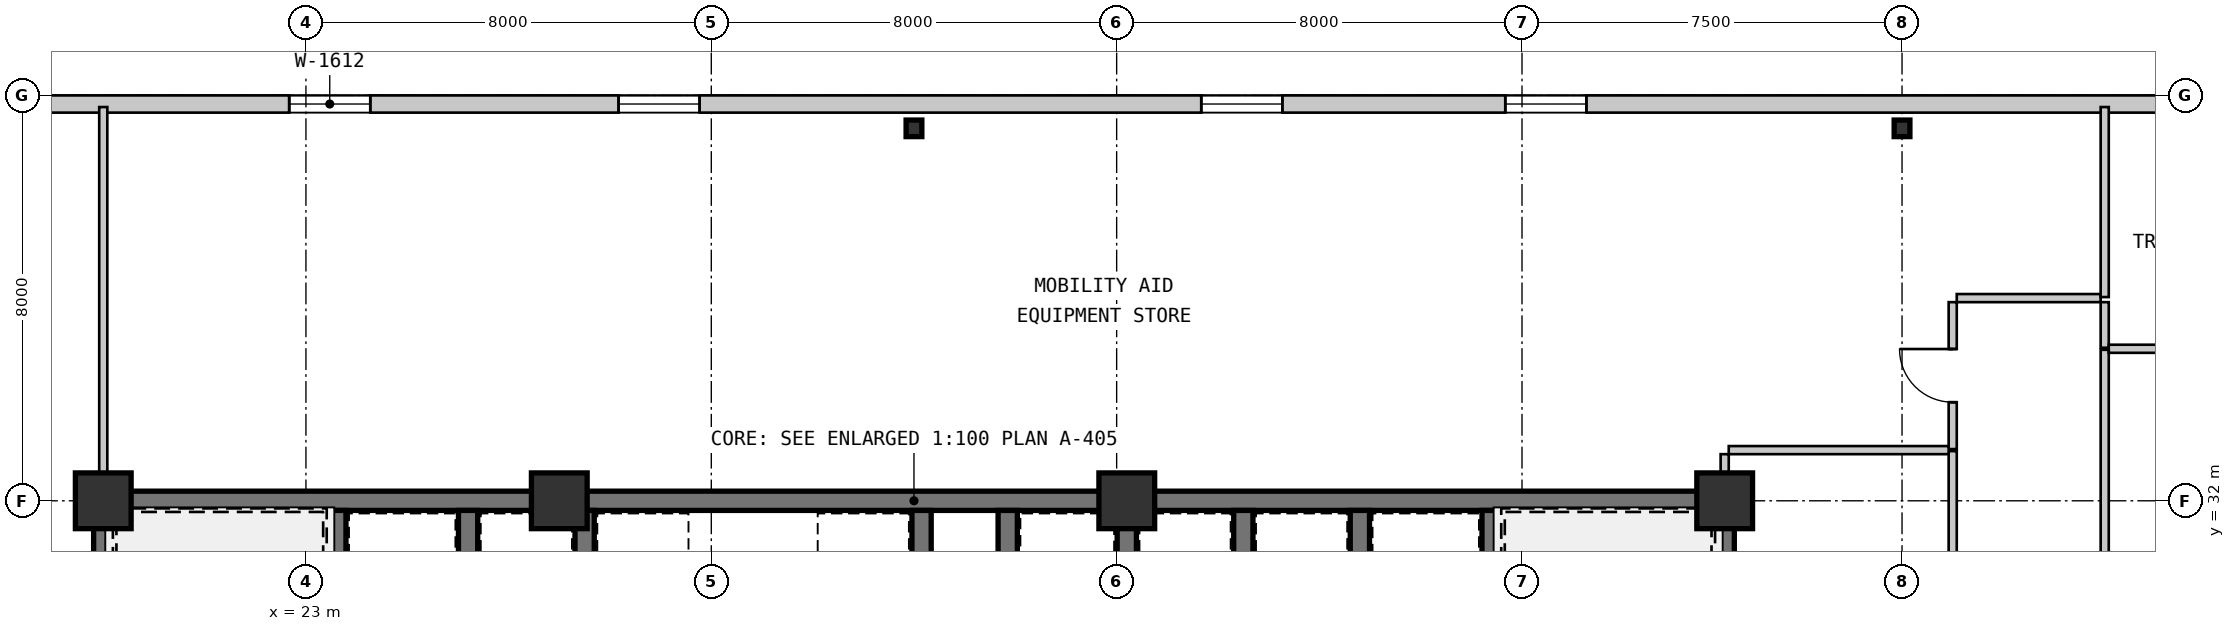
"""IFC4 building model, lengths in metres.
Left out: names, types, materials, properties, quantities, classifications, styles, units other than length and angle.
Written with IfcOpenShell. Run it as: python <this file> out.ifc"""

import sys

from ifc_helpers import new_model, si_unit, direction, frame, frame_2d, origin, origin_2d, place, context, subcontext, project, spatial, rectangle, i_section, extrude, source, transform, mapped, element, fill, save


model = new_model("IFC4")
c1 = context("Model", 3, precision=1e-05, world=origin(), true_north=direction((0.0, 1.0)))
c2 = subcontext(c1, "Body", "Model", "MODEL_VIEW")
j1 = project(units=[si_unit("LENGTHUNIT", "METRE"), si_unit("PLANEANGLEUNIT", "RADIAN")], contexts=[c1])
p1 = place(None, origin())
s1 = spatial("IfcSite", under=j1, at=p1, CompositionType="ELEMENT")
p2 = place(p1, origin())
s2 = spatial("IfcBuilding", under=s1, at=p2, CompositionType="ELEMENT")
p3 = place(p2, frame((0.0, 0.0, 8.4)))
s3 = spatial("IfcBuildingStorey", under=s2, at=p3, CompositionType="ELEMENT", Elevation=8.4)
m1 = source(origin(), c2, "Body", "SweptSolid", [
    extrude(rectangle(XDim=1.1, YDim=1.1, at=origin_2d()), origin(), (0.0, 0.0, 1.0), 4.55),
])
for number, where, z_axis, x_axis in (
    (1, (19.0, 32.0, 0.0), (0.0, 0.0, 1.0), (1.0, 0.0, 0.0)),
    (2, (28.0, 32.0, 0.0), (0.0, 0.0, 1.0), (1.0, 0.0, 0.0)),
    (3, (39.2, 32.0, 0.0), (0.0, 0.0, 1.0), (1.0, 0.0, 0.0)),
    (4, (51.0, 32.0, 0.0), (0.0, 0.0, 1.0), (1.0, 0.0, 0.0)),
):
    element("IfcColumn", number, at=place(p3, frame(where, z_axis=z_axis, x_axis=x_axis)), inside=s3, PredefinedType="COLUMN", context=c2, shape_type="MappedRepresentation", body=[
        mapped(m1, transform((0.0, 0.0, 0.0), scale=1.0)),
    ])
m2 = source(origin(), c2, "Body", "SweptSolid", [
    extrude(i_section(OverallWidth=0.311, OverallDepth=0.327, WebThickness=0.016, FlangeThickness=0.025, at=origin_2d()), origin(), (0.0, 0.0, 1.0), 4.55),
])
for number, where, z_axis, x_axis in (
    (5, (35.0, 39.35, 0.0), (0.0, 0.0, 1.0), (1.0, 0.0, 0.0)),
    (6, (54.5, 39.35, 0.0), (0.0, 0.0, 1.0), (1.0, 0.0, 0.0)),
):
    element("IfcColumn", number, at=place(p3, frame(where, z_axis=z_axis, x_axis=x_axis)), inside=s3, PredefinedType="COLUMN", context=c2, shape_type="MappedRepresentation", body=[
        mapped(m2, transform((0.0, 0.0, 0.0), scale=1.0)),
    ])
m3 = source(origin(), c2, "Body", "SweptSolid", [
    extrude(rectangle(XDim=69.66, YDim=0.34, at=frame_2d((34.83, 0.0))), origin(), (0.0, 0.0, 1.0), 4.29),
])
p4 = place(p3, frame((0.17, 39.83, 0.0), z_axis=(0.0, 0.0, 1.0), x_axis=(1.0, 0.0, 0.0)))
e7 = element("IfcWall", 7, at=p4, inside=s3, PredefinedType="SOLIDWALL", context=c2, shape_type="MappedRepresentation", body=[
    mapped(m3, transform((0.0, 0.0, 0.0), scale=1.0)),
])
m4 = source(origin(), c2, "Body", "SweptSolid", [
    extrude(rectangle(XDim=1.6, YDim=1.2, at=frame_2d((0.8, 0.6))), frame((0.0, 0.18, 0.0), z_axis=(0.0, -1.0, 0.0), x_axis=(1.0, 0.0, 0.0)), (0.0, 0.0, 1.0), 0.36),
])
p5 = place(p4, frame((4.5, 0.0, 0.95)))
e8 = element("IfcOpeningElement", 8, at=p5, cuts=e7, PredefinedType="OPENING", context=c2, shape_type="MappedRepresentation", body=[
    mapped(m4, transform((0.0, 0.0, 0.0), scale=1.0)),
])
p6 = place(p4, frame((22.5, 0.0, 0.95)))
e9 = element("IfcOpeningElement", 9, at=p6, cuts=e7, PredefinedType="OPENING", context=c2, shape_type="MappedRepresentation", body=[
    mapped(m4, transform((0.0, 0.0, 0.0), scale=1.0)),
])
p7 = place(p4, frame((29.0, 0.0, 0.95)))
e10 = element("IfcOpeningElement", 10, at=p7, cuts=e7, PredefinedType="OPENING", context=c2, shape_type="MappedRepresentation", body=[
    mapped(m4, transform((0.0, 0.0, 0.0), scale=1.0)),
])
p8 = place(p4, frame((40.5, 0.0, 0.95)))
e11 = element("IfcOpeningElement", 11, at=p8, cuts=e7, PredefinedType="OPENING", context=c2, shape_type="MappedRepresentation", body=[
    mapped(m4, transform((0.0, 0.0, 0.0), scale=1.0)),
])
p9 = place(p4, frame((46.5, 0.0, 0.95)))
e12 = element("IfcOpeningElement", 12, at=p9, cuts=e7, PredefinedType="OPENING", context=c2, shape_type="MappedRepresentation", body=[
    mapped(m4, transform((0.0, 0.0, 0.0), scale=1.0)),
])
p10 = place(p4, frame((62.5, 0.0, 0.95)))
e13 = element("IfcOpeningElement", 13, at=p10, cuts=e7, PredefinedType="OPENING", context=c2, shape_type="MappedRepresentation", body=[
    mapped(m4, transform((0.0, 0.0, 0.0), scale=1.0)),
])
m5 = source(origin(), c2, "Body", "SweptSolid", [
    extrude(rectangle(XDim=9.19, YDim=0.38, at=frame_2d((4.595, 0.0))), origin(), (0.0, 0.0, 1.0), 4.29),
])
p11 = place(p3, frame((18.81, 32.0, 0.0), z_axis=(0.0, 0.0, 1.0), x_axis=(1.0, 0.0, 0.0)))
e14 = element("IfcWall", 14, at=p11, inside=s3, PredefinedType="SHEAR", context=c2, shape_type="MappedRepresentation", body=[
    mapped(m5, transform((0.0, 0.0, 0.0), scale=1.0)),
])
m6 = source(origin(), c2, "Body", "SweptSolid", [
    extrude(rectangle(XDim=11.2, YDim=0.38, at=frame_2d((5.6, 0.0))), origin(), (0.0, 0.0, 1.0), 4.29),
])
p12 = place(p3, frame((28.0, 32.0, 0.0), z_axis=(0.0, 0.0, 1.0), x_axis=(1.0, 0.0, 0.0)))
e15 = element("IfcWall", 15, at=p12, inside=s3, PredefinedType="SHEAR", context=c2, shape_type="MappedRepresentation", body=[
    mapped(m6, transform((0.0, 0.0, 0.0), scale=1.0)),
])
m7 = source(origin(), c2, "Body", "SweptSolid", [
    extrude(rectangle(XDim=11.99, YDim=0.38, at=frame_2d((5.995, 0.0))), origin(), (0.0, 0.0, 1.0), 4.29),
])
p13 = place(p3, frame((39.2, 32.0, 0.0), z_axis=(0.0, 0.0, 1.0), x_axis=(1.0, 0.0, 0.0)))
e16 = element("IfcWall", 16, at=p13, inside=s3, PredefinedType="SHEAR", context=c2, shape_type="MappedRepresentation", body=[
    mapped(m7, transform((0.0, 0.0, 0.0), scale=1.0)),
])
m8 = source(origin(), c2, "Body", "SweptSolid", [
    extrude(rectangle(XDim=3.61, YDim=0.38, at=frame_2d((1.805, 0.0))), origin(), (0.0, 0.0, 1.0), 4.29),
])
for number, where, z_axis, x_axis in (
    (17, (19.0, 28.2, 0.0), (0.0, 0.0, 1.0), (0.0, 1.0, 0.0)),
    (18, (51.0, 28.2, 0.0), (0.0, 0.0, 1.0), (0.0, 1.0, 0.0)),
):
    element("IfcWall", number, at=place(p3, frame(where, z_axis=z_axis, x_axis=x_axis)), inside=s3, PredefinedType="SHEAR", context=c2, shape_type="MappedRepresentation", body=[
        mapped(m8, transform((0.0, 0.0, 0.0), scale=1.0)),
    ])
m9 = source(origin(), c2, "Body", "SweptSolid", [
    extrude(rectangle(XDim=3.42, YDim=0.38, at=frame_2d((1.71, 0.0))), origin(), (0.0, 0.0, 1.0), 4.29),
])
for number, where, z_axis, x_axis in (
    (19, (23.6, 28.39, 0.0), (0.0, 0.0, 1.0), (0.0, 1.0, 0.0)),
    (20, (26.2, 28.39, 0.0), (0.0, 0.0, 1.0), (0.0, 1.0, 0.0)),
    (21, (46.4, 31.81, 0.0), (0.0, 0.0, 1.0), (0.0, -1.0, 0.0)),
    (22, (43.8, 31.81, 0.0), (0.0, 0.0, 1.0), (0.0, -1.0, 0.0)),
):
    element("IfcWall", number, at=place(p3, frame(where, z_axis=z_axis, x_axis=x_axis)), inside=s3, PredefinedType="SHEAR", context=c2, shape_type="MappedRepresentation", body=[
        mapped(m9, transform((0.0, 0.0, 0.0), scale=1.0)),
    ])
m10 = source(origin(), c2, "Body", "SweptSolid", [
    extrude(rectangle(XDim=1.12, YDim=0.38, at=frame_2d((0.56, 0.0))), origin(), (0.0, 0.0, 1.0), 4.29),
])
for number, where, z_axis, x_axis in (
    (23, (35.15, 31.81, 0.0), (0.0, 0.0, 1.0), (0.0, -1.0, 0.0)),
    (24, (36.85, 30.69, 0.0), (0.0, 0.0, 1.0), (0.0, 1.0, 0.0)),
):
    element("IfcWall", number, at=place(p3, frame(where, z_axis=z_axis, x_axis=x_axis)), inside=s3, PredefinedType="SHEAR", context=c2, shape_type="MappedRepresentation", body=[
        mapped(m10, transform((0.0, 0.0, 0.0), scale=1.0)),
    ])
for number, where, z_axis, x_axis in (
    (25, (28.5, 28.39, 0.0), (0.0, 0.0, 1.0), (0.0, 1.0, 0.0)),
    (26, (39.2, 28.39, 0.0), (0.0, 0.0, 1.0), (0.0, 1.0, 0.0)),
    (27, (41.5, 28.39, 0.0), (0.0, 0.0, 1.0), (0.0, 1.0, 0.0)),
):
    element("IfcWall", number, at=place(p3, frame(where, z_axis=z_axis, x_axis=x_axis)), inside=s3, PredefinedType="SHEAR", context=c2, shape_type="MappedRepresentation", body=[
        mapped(m9, transform((0.0, 0.0, 0.0), scale=1.0)),
    ])
m11 = source(origin(), c2, "Body", "SweptSolid", [
    extrude(rectangle(XDim=9.959, YDim=0.16, at=frame_2d((4.98, 0.0))), origin(), (0.0, 0.0, 1.0), 4.29),
])
p14 = place(p3, frame((58.5, 34.98, 0.0), z_axis=(0.0, 0.0, 1.0), x_axis=(0.0, -1.0, 0.0)))
e28 = element("IfcWall", 28, at=p14, inside=s3, PredefinedType="PARTITIONING", context=c2, shape_type="MappedRepresentation", body=[
    mapped(m11, transform((0.0, 0.0, 0.0), scale=1.0)),
])
m12 = source(origin(), c2, "Body", "SweptSolid", [
    extrude(rectangle(XDim=1.05, YDim=2.1, at=frame_2d((0.525, 1.05))), frame((0.0, 0.09, 0.0), z_axis=(0.0, -1.0, 0.0), x_axis=(1.0, 0.0, 0.0)), (0.0, 0.0, 1.0), 0.18),
])
p15 = place(p14, frame((4.455, 0.0, 0.0)))
e29 = element("IfcOpeningElement", 29, at=p15, cuts=e28, PredefinedType="OPENING", context=c2, shape_type="MappedRepresentation", body=[
    mapped(m12, transform((0.0, 0.0, 0.0), scale=1.0)),
])
m13 = source(origin(), c2, "Body", "SweptSolid", [
    extrude(rectangle(XDim=0.9, YDim=0.16, at=frame_2d((0.45, 0.0))), origin(), (0.0, 0.0, 1.0), 4.29),
])
p16 = place(p3, frame((58.5, 35.92, 0.0), z_axis=(0.0, 0.0, 1.0), x_axis=(0.0, -1.0, 0.0)))
e30 = element("IfcWall", 30, at=p16, inside=s3, PredefinedType="PARTITIONING", context=c2, shape_type="MappedRepresentation", body=[
    mapped(m13, transform((0.0, 0.0, 0.0), scale=1.0)),
])
m14 = source(origin(), c2, "Body", "SweptSolid", [
    extrude(rectangle(XDim=8.9, YDim=0.16, at=frame_2d((4.45, 0.0))), origin(), (0.0, 0.0, 1.0), 4.29),
])
p17 = place(p3, frame((55.5, 24.08, 0.0), z_axis=(0.0, 0.0, 1.0), x_axis=(0.0, 1.0, 0.0)))
e31 = element("IfcWall", 31, at=p17, inside=s3, PredefinedType="PARTITIONING", context=c2, shape_type="MappedRepresentation", body=[
    mapped(m14, transform((0.0, 0.0, 0.0), scale=1.0)),
])
p18 = place(p17, frame((3.895, 0.0, 0.0)))
e32 = element("IfcOpeningElement", 32, at=p18, cuts=e31, PredefinedType="OPENING", context=c2, shape_type="MappedRepresentation", body=[
    mapped(m12, transform((0.0, 0.0, 0.0), scale=1.0)),
])
m15 = source(origin(), c2, "Body", "SweptSolid", [
    extrude(rectangle(XDim=2.9, YDim=0.16, at=frame_2d((1.45, 0.0))), origin(), (0.0, 0.0, 1.0), 4.29),
])
p19 = place(p3, frame((55.5, 33.02, 0.0), z_axis=(0.0, 0.0, 1.0), x_axis=(0.0, 1.0, 0.0)))
e33 = element("IfcWall", 33, at=p19, inside=s3, PredefinedType="PARTITIONING", context=c2, shape_type="MappedRepresentation", body=[
    mapped(m15, transform((0.0, 0.0, 0.0), scale=1.0)),
])
p20 = place(p19, frame((0.925, 0.0, 0.0)))
e34 = element("IfcOpeningElement", 34, at=p20, cuts=e33, PredefinedType="OPENING", context=c2, shape_type="MappedRepresentation", body=[
    mapped(m12, transform((0.0, 0.0, 0.0), scale=1.0)),
])
m16 = source(origin(), c2, "Body", "SweptSolid", [
    extrude(rectangle(XDim=2.84, YDim=0.16, at=frame_2d((1.42, 0.0))), origin(), (0.0, 0.0, 1.0), 4.29),
])
p21 = place(p3, frame((55.58, 36.0, 0.0), z_axis=(0.0, 0.0, 1.0), x_axis=(1.0, 0.0, 0.0)))
e35 = element("IfcWall", 35, at=p21, inside=s3, PredefinedType="PARTITIONING", context=c2, shape_type="MappedRepresentation", body=[
    mapped(m16, transform((0.0, 0.0, 0.0), scale=1.0)),
])
m17 = source(origin(), c2, "Body", "SweptSolid", [
    extrude(rectangle(XDim=7.58, YDim=0.16, at=frame_2d((3.79, 0.0))), origin(), (0.0, 0.0, 1.0), 4.29),
])
p22 = place(p3, frame((19.0, 39.77, 0.0), z_axis=(0.0, 0.0, 1.0), x_axis=(0.0, -1.0, 0.0)))
e36 = element("IfcWall", 36, at=p22, inside=s3, PredefinedType="PARTITIONING", context=c2, shape_type="MappedRepresentation", body=[
    mapped(m17, transform((0.0, 0.0, 0.0), scale=1.0)),
])
m18 = source(origin(), c2, "Body", "SweptSolid", [
    extrude(rectangle(XDim=11.19, YDim=0.16, at=frame_2d((5.595, 0.0))), origin(), (0.0, 0.0, 1.0), 4.29),
])
p23 = place(p3, frame((58.58, 35.0, 0.0), z_axis=(0.0, 0.0, 1.0), x_axis=(1.0, 0.0, 0.0)))
e37 = element("IfcWall", 37, at=p23, inside=s3, PredefinedType="PARTITIONING", context=c2, shape_type="MappedRepresentation", body=[
    mapped(m18, transform((0.0, 0.0, 0.0), scale=1.0)),
])
m19 = source(origin(), c2, "Body", "SweptSolid", [
    extrude(rectangle(XDim=0.86, YDim=2.1, at=frame_2d((0.43, 1.05))), frame((0.0, 0.09, 0.0), z_axis=(0.0, -1.0, 0.0), x_axis=(1.0, 0.0, 0.0)), (0.0, 0.0, 1.0), 0.18),
])
p24 = place(p23, frame((5.165, 0.0, 0.0)))
e38 = element("IfcOpeningElement", 38, at=p24, cuts=e37, PredefinedType="OPENING", context=c2, shape_type="MappedRepresentation", body=[
    mapped(m19, transform((0.0, 0.0, 0.0), scale=1.0)),
])
m20 = source(origin(), c2, "Body", "SweptSolid", [
    extrude(rectangle(XDim=3.75, YDim=0.16, at=frame_2d((1.875, 0.0))), origin(), (0.0, 0.0, 1.0), 4.29),
])
p25 = place(p3, frame((58.5, 36.02, 0.0), z_axis=(0.0, 0.0, 1.0), x_axis=(0.0, 1.0, 0.0)))
e39 = element("IfcWall", 39, at=p25, inside=s3, PredefinedType="PARTITIONING", context=c2, shape_type="MappedRepresentation", body=[
    mapped(m20, transform((0.0, 0.0, 0.0), scale=1.0)),
])
m21 = source(origin(), c2, "Body", "SweptSolid", [
    extrude(rectangle(XDim=4.34, YDim=0.16, at=frame_2d((2.17, 0.0))), origin(), (0.0, 0.0, 1.0), 4.29),
])
p26 = place(p3, frame((51.08, 33.0, 0.0), z_axis=(0.0, 0.0, 1.0), x_axis=(1.0, 0.0, 0.0)))
e40 = element("IfcWall", 40, at=p26, inside=s3, PredefinedType="PARTITIONING", context=c2, shape_type="MappedRepresentation", body=[
    mapped(m21, transform((0.0, 0.0, 0.0), scale=1.0)),
])
m22 = source(origin(), c2, "Body", "SweptSolid", [
    extrude(rectangle(XDim=0.73, YDim=0.16, at=frame_2d((0.365, 0.0))), origin(), (0.0, 0.0, 1.0), 4.29),
])
p27 = place(p3, frame((51.0, 32.19, 0.0), z_axis=(0.0, 0.0, 1.0), x_axis=(0.0, 1.0, 0.0)))
e41 = element("IfcWall", 41, at=p27, inside=s3, PredefinedType="PARTITIONING", context=c2, shape_type="MappedRepresentation", body=[
    mapped(m22, transform((0.0, 0.0, 0.0), scale=1.0)),
])
m23 = source(origin(), c2, "Body", "SweptSolid", [
    extrude(rectangle(XDim=1.6, YDim=1.2, at=frame_2d((0.8, 0.6))), frame((0.0, 0.03, 0.0), z_axis=(0.0, -1.0, 0.0), x_axis=(1.0, 0.0, 0.0)), (0.0, 0.0, 1.0), 0.06),
])
p28 = place(p6, origin())
e42 = element("IfcWindow", 42, at=p28, inside=s3, PartitioningType="SINGLE_PANEL", PredefinedType="WINDOW", context=c2, shape_type="MappedRepresentation", body=[
    mapped(m23, transform((0.0, 0.0, 0.0), scale=1.0)),
])
fill(e9, e42)
p29 = place(p7, origin())
e43 = element("IfcWindow", 43, at=p29, inside=s3, PartitioningType="SINGLE_PANEL", PredefinedType="WINDOW", context=c2, shape_type="MappedRepresentation", body=[
    mapped(m23, transform((0.0, 0.0, 0.0), scale=1.0)),
])
fill(e10, e43)
p30 = place(p8, origin())
e44 = element("IfcWindow", 44, at=p30, inside=s3, PartitioningType="SINGLE_PANEL", PredefinedType="WINDOW", context=c2, shape_type="MappedRepresentation", body=[
    mapped(m23, transform((0.0, 0.0, 0.0), scale=1.0)),
])
fill(e11, e44)
p31 = place(p9, origin())
e45 = element("IfcWindow", 45, at=p31, inside=s3, PartitioningType="SINGLE_PANEL", PredefinedType="WINDOW", context=c2, shape_type="MappedRepresentation", body=[
    mapped(m23, transform((0.0, 0.0, 0.0), scale=1.0)),
])
fill(e12, e45)
m24 = source(origin(), c2, "Body", "SweptSolid", [
    extrude(rectangle(XDim=1.05, YDim=2.1, at=frame_2d((0.525, 1.05))), frame((0.0, 0.025, 0.0), z_axis=(0.0, -1.0, 0.0), x_axis=(1.0, 0.0, 0.0)), (0.0, 0.0, 1.0), 0.05),
])
p32 = place(p20, origin())
e46 = element("IfcDoor", 46, at=p32, inside=s3, OperationType="SINGLE_SWING_RIGHT", PredefinedType="DOOR", context=c2, shape_type="MappedRepresentation", body=[
    mapped(m24, transform((0.0, 0.0, 0.0), scale=1.0)),
])
fill(e34, e46)
save(model, sys.argv[1])
